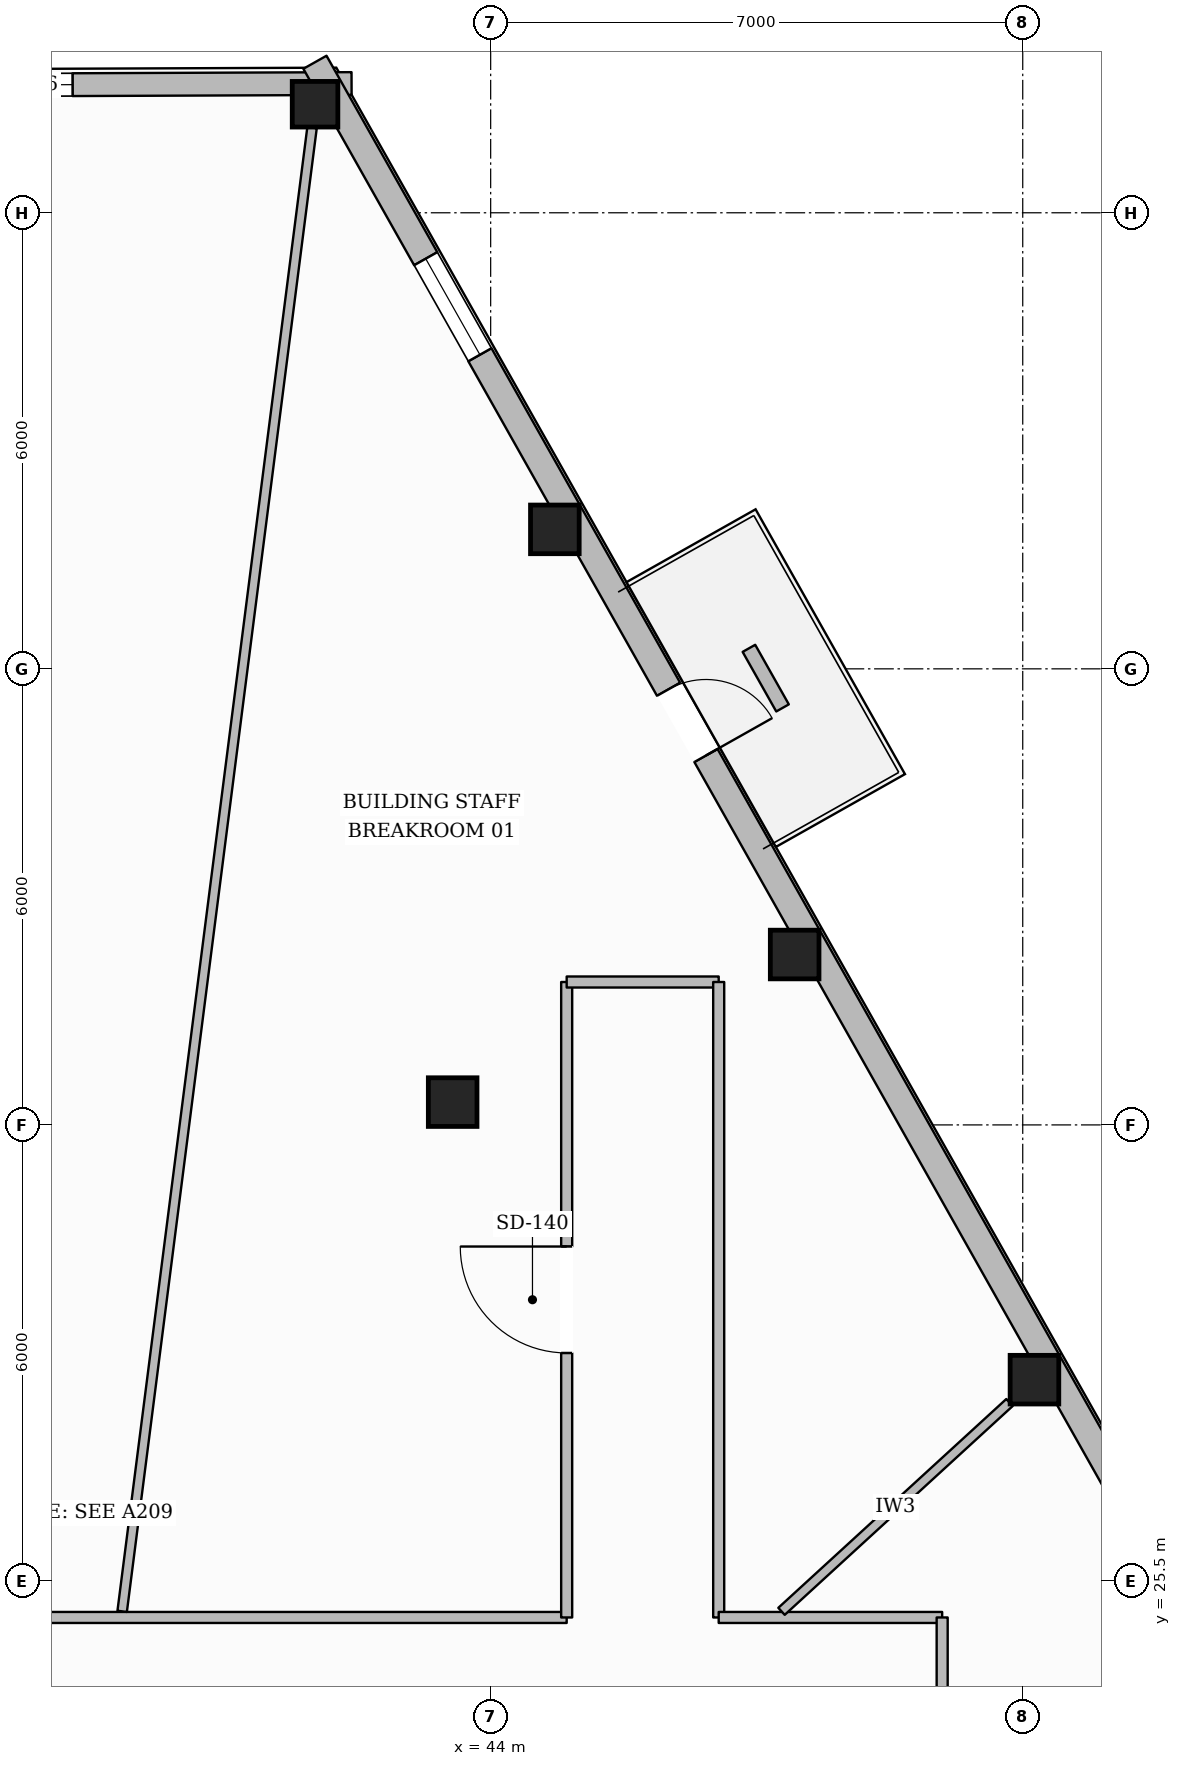
"""IFC4 building model, lengths in metres.
Left out: names, types, materials, properties, quantities, classifications, styles, units other than length and angle.
Written with IfcOpenShell. Run it as: python <this file> out.ifc"""

import sys

from ifc_helpers import new_model, si_unit, direction, frame, frame_2d, origin, origin_2d, place, context, subcontext, project, spatial, rectangle, hollow_rectangle, extrude, element, fill, save


model = new_model("IFC4")
c1 = context("Model", 3, precision=1e-05, world=origin(), true_north=direction((0.0, 1.0)))
c2 = subcontext(c1, "Body", "Model", "MODEL_VIEW")
j1 = project(units=[si_unit("LENGTHUNIT", "METRE"), si_unit("PLANEANGLEUNIT", "RADIAN")], contexts=[c1])
p1 = place(None, origin())
s1 = spatial("IfcSite", under=j1, at=p1, CompositionType="ELEMENT")
p2 = place(p1, origin())
s2 = spatial("IfcBuilding", under=s1, at=p2, CompositionType="ELEMENT")
p3 = place(p2, frame((0.0, 0.0, 230.45)))
s3 = spatial("IfcBuildingStorey", under=s2, at=p3, CompositionType="ELEMENT", Elevation=230.45)
for number, where, z_axis, x_axis in (
    (1, (51.154, 28.148, 0.0), (0.0, 0.0, 1.0), (1.0, 0.0, 0.0)),
    (2, (47.999, 33.742, 0.0), (0.0, 0.0, 1.0), (1.0, 0.0, 0.0)),
    (3, (44.844, 39.335, 0.0), (0.0, 0.0, 1.0), (1.0, 0.0, 0.0)),
):
    element("IfcColumn", number, at=place(p3, frame(where, z_axis=z_axis, x_axis=x_axis)), inside=s3, PredefinedType="COLUMN", context=c2, shape_type="SweptSolid", body=[
        extrude(hollow_rectangle(XDim=0.64, YDim=0.64, WallThickness=0.028, at=origin_2d()), origin(), (0.0, 0.0, 1.0), 3.43),
    ])
p4 = place(p3, frame((41.689, 44.928, 0.0), z_axis=(0.0, 0.0, 1.0), x_axis=(1.0, 0.0, 0.0)))
e4 = element("IfcColumn", 4, at=p4, inside=s3, PredefinedType="COLUMN", context=c2, shape_type="SweptSolid", body=[
    extrude(hollow_rectangle(XDim=0.6, YDim=0.6, WallThickness=0.028, at=origin_2d()), origin(), (0.0, 0.0, 1.0), 3.43),
])
p5 = place(p3, frame((43.5, 31.8, 0.0), z_axis=(0.0, 0.0, 1.0), x_axis=(1.0, 0.0, 0.0)))
e5 = element("IfcColumn", 5, at=p5, inside=s3, PredefinedType="COLUMN", context=c2, shape_type="SweptSolid", body=[
    extrude(hollow_rectangle(XDim=0.64, YDim=0.64, WallThickness=0.028, at=origin_2d()), origin(), (0.0, 0.0, 1.0), 3.43),
])
p6 = place(p3, frame((33.778, 45.167, 0.0), z_axis=(0.0, 0.0, 1.0), x_axis=(0.999992288354, 0.003927242442, 0.0)))
e6 = element("IfcWall", 6, at=p6, inside=s3, PredefinedType="STANDARD", context=c2, shape_type="SweptSolid", body=[
    extrude(rectangle(XDim=8.392, YDim=0.3, at=frame_2d((4.196, 0.0))), origin(), (0.0, 0.0, 1.0), 2.962),
])
p7 = place(p6, frame((3.671, 0.0, 0.65)))
e7 = element("IfcOpeningElement", 7, at=p7, cuts=e6, PredefinedType="OPENING", context=c2, shape_type="SweptSolid", body=[
    extrude(rectangle(XDim=1.05, YDim=1.55, at=frame_2d((0.525, 0.775))), frame((0.0, 0.16, 0.0), z_axis=(0.0, -1.0, 0.0), x_axis=(1.0, 0.0, 0.0)), (0.0, 0.0, 1.0), 0.32),
])
p8 = place(p3, frame((41.688, 45.48, 0.0), z_axis=(0.0, 0.0, 1.0), x_axis=(0.491295447758, -0.870992986775, 0.0)))
e8 = element("IfcWall", 8, at=p8, inside=s3, PredefinedType="STANDARD", context=c2, shape_type="SweptSolid", body=[
    extrude(rectangle(XDim=39.483, YDim=0.35, at=frame_2d((19.742, 0.0))), origin(), (0.0, 0.0, 1.0), 2.962),
])
p9 = place(p8, frame((9.471, 0.0, 0.0)))
e9 = element("IfcOpeningElement", 9, at=p9, cuts=e8, PredefinedType="OPENING", context=c2, shape_type="SweptSolid", body=[
    extrude(rectangle(XDim=1.0, YDim=2.2, at=frame_2d((0.5, 1.1))), frame((0.0, 0.185, 0.0), z_axis=(0.0, -1.0, 0.0), x_axis=(1.0, 0.0, 0.0)), (0.0, 0.0, 1.0), 0.37),
])
p10 = place(p8, frame((35.076, 0.0, 0.55)))
e10 = element("IfcOpeningElement", 10, at=p10, cuts=e8, PredefinedType="OPENING", context=c2, shape_type="SweptSolid", body=[
    extrude(rectangle(XDim=1.45, YDim=1.6, at=frame_2d((0.725, 0.8))), frame((0.0, 0.185, 0.0), z_axis=(0.0, -1.0, 0.0), x_axis=(1.0, 0.0, 0.0)), (0.0, 0.0, 1.0), 0.37),
])
p11 = place(p8, frame((28.654, 0.0, 0.55)))
e11 = element("IfcOpeningElement", 11, at=p11, cuts=e8, PredefinedType="OPENING", context=c2, shape_type="SweptSolid", body=[
    extrude(rectangle(XDim=1.45, YDim=1.6, at=frame_2d((0.725, 0.8))), frame((0.0, 0.185, 0.0), z_axis=(0.0, -1.0, 0.0), x_axis=(1.0, 0.0, 0.0)), (0.0, 0.0, 1.0), 0.37),
])
p12 = place(p8, frame((22.232, 0.0, 0.55)))
e12 = element("IfcOpeningElement", 12, at=p12, cuts=e8, PredefinedType="OPENING", context=c2, shape_type="SweptSolid", body=[
    extrude(rectangle(XDim=1.45, YDim=1.6, at=frame_2d((0.725, 0.8))), frame((0.0, 0.185, 0.0), z_axis=(0.0, -1.0, 0.0), x_axis=(1.0, 0.0, 0.0)), (0.0, 0.0, 1.0), 0.37),
])
p13 = place(p8, frame((2.967, 0.0, 0.55)))
e13 = element("IfcOpeningElement", 13, at=p13, cuts=e8, PredefinedType="OPENING", context=c2, shape_type="SweptSolid", body=[
    extrude(rectangle(XDim=1.45, YDim=1.6, at=frame_2d((0.725, 0.8))), frame((0.0, 0.185, 0.0), z_axis=(0.0, -1.0, 0.0), x_axis=(1.0, 0.0, 0.0)), (0.0, 0.0, 1.0), 0.37),
])
p14 = place(p3, frame((47.84, 36.986, 0.0), z_axis=(0.0, 0.0, 1.0), x_axis=(-0.491252592378, 0.871017158546, 0.0)))
e14 = element("IfcWall", 14, at=p14, inside=s3, PredefinedType="USERDEFINED", context=c2, shape_type="SweptSolid", body=[
    extrude(rectangle(XDim=0.9, YDim=0.19, at=frame_2d((0.45, 0.0))), origin(), (0.0, 0.0, 1.0), 0.5),
])
p15 = place(p3, frame((31.0, 25.02, 0.0), z_axis=(0.0, 0.0, 1.0), x_axis=(1.0, 0.0, 0.0)))
e15 = element("IfcWall", 15, at=p15, inside=s3, PredefinedType="PARTITIONING", context=c2, shape_type="SweptSolid", body=[
    extrude(rectangle(XDim=14.0, YDim=0.145, at=frame_2d((7.0, 0.0))), origin(), (0.0, 0.0, 1.0), 3.43),
])
p16 = place(p3, frame((45.0, 25.02, 0.0), z_axis=(0.0, 0.0, 1.0), x_axis=(0.0, 1.0, 0.0)))
e16 = element("IfcWall", 16, at=p16, inside=s3, PredefinedType="PARTITIONING", context=c2, shape_type="SweptSolid", body=[
    extrude(rectangle(XDim=8.36, YDim=0.145, at=frame_2d((4.18, 0.0))), origin(), (0.0, 0.0, 1.0), 2.971),
])
p17 = place(p16, frame((3.48, 0.0, 0.0)))
e17 = element("IfcOpeningElement", 17, at=p17, cuts=e16, PredefinedType="OPENING", context=c2, shape_type="SweptSolid", body=[
    extrude(rectangle(XDim=1.4, YDim=2.2, at=frame_2d((0.7, 1.1))), frame((0.0, 0.083, 0.0), z_axis=(0.0, -1.0, 0.0), x_axis=(1.0, 0.0, 0.0)), (0.0, 0.0, 1.0), 0.165),
])
p18 = place(p3, frame((45.0, 33.38, 0.0), z_axis=(0.0, 0.0, 1.0), x_axis=(1.0, 0.0, 0.0)))
e18 = element("IfcWall", 18, at=p18, inside=s3, PredefinedType="PARTITIONING", context=c2, shape_type="SweptSolid", body=[
    extrude(rectangle(XDim=2.0, YDim=0.145, at=frame_2d((1.0, 0.0))), origin(), (0.0, 0.0, 1.0), 3.43),
])
p19 = place(p3, frame((47.0, 33.38, 0.0), z_axis=(0.0, 0.0, 1.0), x_axis=(0.0, -1.0, 0.0)))
e19 = element("IfcWall", 19, at=p19, inside=s3, PredefinedType="PARTITIONING", context=c2, shape_type="SweptSolid", body=[
    extrude(rectangle(XDim=8.36, YDim=0.145, at=frame_2d((4.18, 0.0))), origin(), (0.0, 0.0, 1.0), 2.971),
])
p20 = place(p3, frame((47.0, 25.02, 0.0), z_axis=(0.0, 0.0, 1.0), x_axis=(1.0, 0.0, 0.0)))
e20 = element("IfcWall", 20, at=p20, inside=s3, PredefinedType="PARTITIONING", context=c2, shape_type="SweptSolid", body=[
    extrude(rectangle(XDim=2.94, YDim=0.145, at=frame_2d((1.47, 0.0))), origin(), (0.0, 0.0, 1.0), 3.43),
])
p21 = place(p3, frame((49.94, 25.02, 0.0), z_axis=(0.0, 0.0, 1.0), x_axis=(0.0, -1.0, 0.0)))
e21 = element("IfcWall", 21, at=p21, inside=s3, PredefinedType="PARTITIONING", context=c2, shape_type="SweptSolid", body=[
    extrude(rectangle(XDim=7.92, YDim=0.145, at=frame_2d((3.96, 0.0))), origin(), (0.0, 0.0, 1.0), 3.169),
])
p22 = place(p21, frame((3.26, 0.0, 0.0)))
e22 = element("IfcOpeningElement", 22, at=p22, cuts=e21, PredefinedType="OPENING", context=c2, shape_type="SweptSolid", body=[
    extrude(rectangle(XDim=1.4, YDim=2.2, at=frame_2d((0.7, 1.1))), frame((0.0, 0.083, 0.0), z_axis=(0.0, -1.0, 0.0), x_axis=(1.0, 0.0, 0.0)), (0.0, 0.0, 1.0), 0.165),
])
p23 = place(p3, frame((47.826, 25.101, 0.0), z_axis=(0.0, 0.0, 1.0), x_axis=(0.737455521612, 0.67539570153, 0.0)))
e23 = element("IfcWall", 23, at=p23, inside=s3, PredefinedType="PARTITIONING", context=c2, shape_type="SweptSolid", body=[
    extrude(rectangle(XDim=4.068, YDim=0.125, at=frame_2d((2.034, 0.0))), origin(), (0.0, 0.0, 1.0), 3.43),
])
p24 = place(p3, frame((39.152, 25.101, 0.0), z_axis=(0.0, 0.0, 1.0), x_axis=(0.126953686854, 0.99190864569, 0.0)))
e24 = element("IfcWall", 24, at=p24, inside=s3, PredefinedType="PARTITIONING", context=c2, shape_type="SweptSolid", body=[
    extrude(rectangle(XDim=19.679, YDim=0.125, at=frame_2d((9.839, 0.0))), origin(), (0.0, 0.0, 1.0), 2.971),
])
p25 = place(p9, origin())
e25 = element("IfcDoor", 25, at=p25, inside=s3, OperationType="SINGLE_SWING_RIGHT", PredefinedType="DOOR", context=c2, shape_type="SweptSolid", body=[
    extrude(rectangle(XDim=1.0, YDim=2.2, at=frame_2d((0.5, 1.1))), frame((0.0, 0.025, 0.0), z_axis=(0.0, -1.0, 0.0), x_axis=(1.0, 0.0, 0.0)), (0.0, 0.0, 1.0), 0.05),
])
fill(e9, e25)
p26 = place(p13, origin())
e26 = element("IfcWindow", 26, at=p26, inside=s3, PartitioningType="SINGLE_PANEL", PredefinedType="WINDOW", context=c2, shape_type="SweptSolid", body=[
    extrude(rectangle(XDim=1.45, YDim=1.6, at=frame_2d((0.725, 0.8))), frame((0.0, 0.03, 0.0), z_axis=(0.0, -1.0, 0.0), x_axis=(1.0, 0.0, 0.0)), (0.0, 0.0, 1.0), 0.06),
])
fill(e13, e26)
p27 = place(p7, origin())
e27 = element("IfcWindow", 27, at=p27, inside=s3, PartitioningType="SINGLE_PANEL", PredefinedType="WINDOW", context=c2, shape_type="SweptSolid", body=[
    extrude(rectangle(XDim=1.05, YDim=1.55, at=frame_2d((0.525, 0.775))), frame((0.0, 0.03, 0.0), z_axis=(0.0, -1.0, 0.0), x_axis=(1.0, 0.0, 0.0)), (0.0, 0.0, 1.0), 0.06),
])
fill(e7, e27)
p28 = place(p17, origin())
e28 = element("IfcDoor", 28, at=p28, inside=s3, OperationType="SINGLE_SWING_RIGHT", PredefinedType="DOOR", context=c2, shape_type="SweptSolid", body=[
    extrude(rectangle(XDim=1.4, YDim=2.2, at=frame_2d((0.7, 1.1))), frame((0.0, 0.025, 0.0), z_axis=(0.0, -1.0, 0.0), x_axis=(1.0, 0.0, 0.0)), (0.0, 0.0, 1.0), 0.05),
])
fill(e17, e28)
save(model, sys.argv[1])
